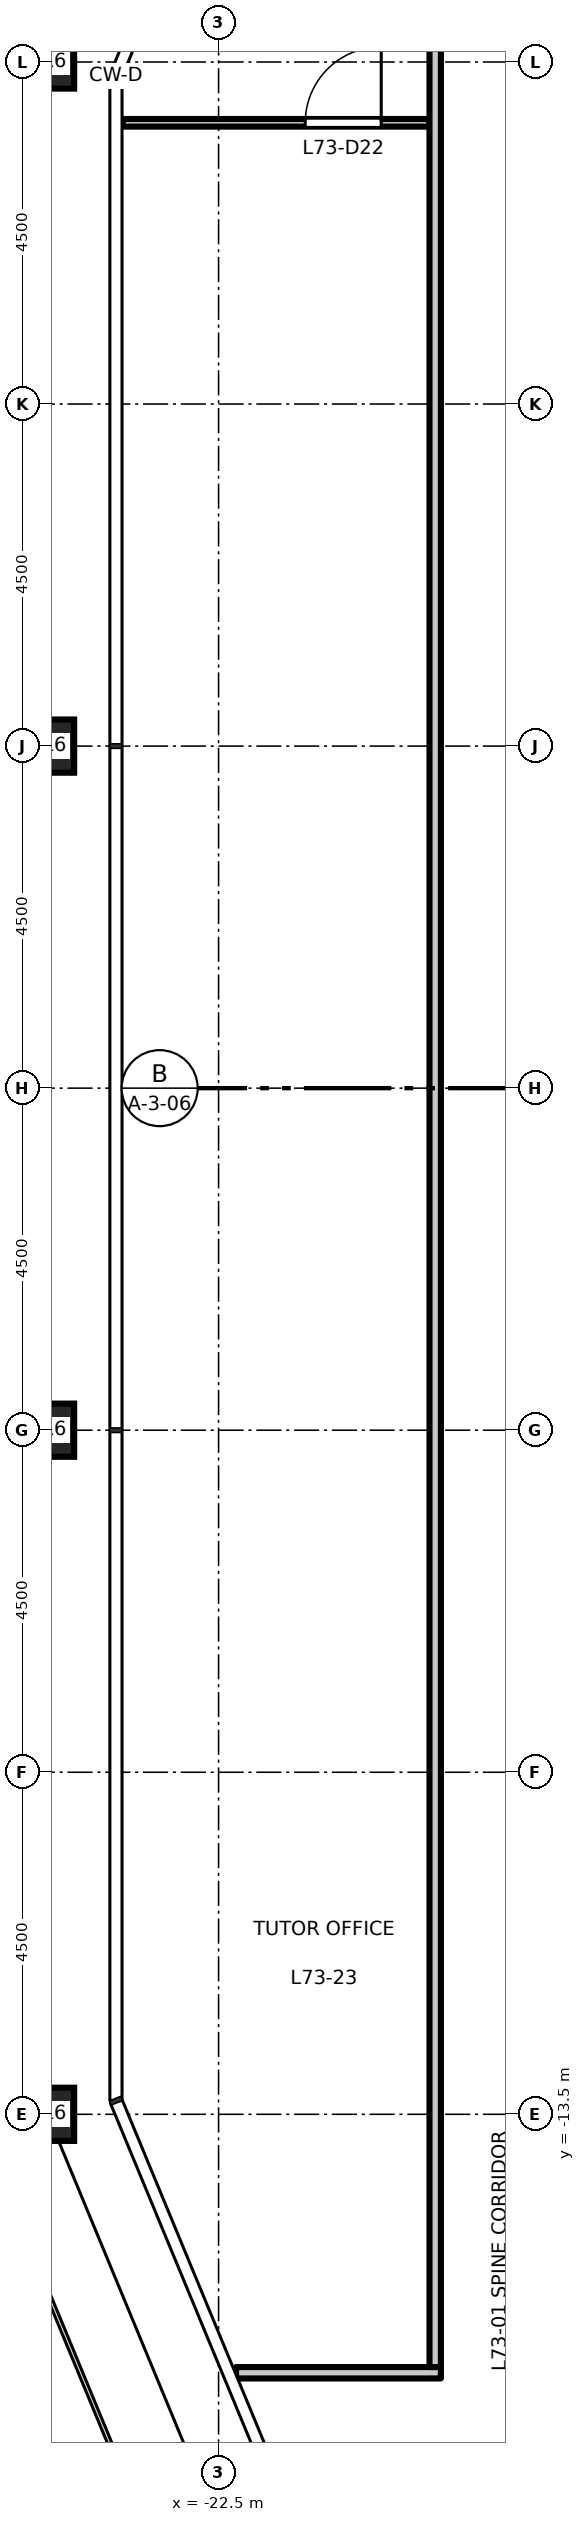
"""IFC4 building model, lengths in metres.
Left out: names, types, materials, properties, quantities, classifications, styles, units other than length and angle.
Written with IfcOpenShell. Run it as: python <this file> out.ifc"""

import sys

from ifc_helpers import new_model, si_unit, direction, frame, frame_2d, origin, origin_2d, place, context, subcontext, project, spatial, rectangle, hollow_rectangle, extrude, element, fill, save


model = new_model("IFC4")
c1 = context("Model", 3, precision=1e-05, world=origin(), true_north=direction((0.0, 1.0)))
c2 = subcontext(c1, "Body", "Model", "MODEL_VIEW")
j1 = project(units=[si_unit("LENGTHUNIT", "METRE"), si_unit("PLANEANGLEUNIT", "RADIAN")], contexts=[c1])
p1 = place(None, origin())
s1 = spatial("IfcSite", under=j1, at=p1, CompositionType="ELEMENT")
p2 = place(p1, origin())
s2 = spatial("IfcBuilding", under=s1, at=p2, CompositionType="ELEMENT")
p3 = place(p2, frame((0.0, 0.0, 339.2)))
s3 = spatial("IfcBuildingStorey", under=s2, at=p3, CompositionType="ELEMENT", Elevation=339.2)
for number, where, z_axis, x_axis in (
    (1, (-24.75, 13.5, 0.0), (0.0, 0.0, 1.0), (1.0, 0.0, 0.0)),
    (2, (-24.75, 4.5, 0.0), (0.0, 0.0, 1.0), (1.0, 0.0, 0.0)),
    (3, (-24.75, -4.5, 0.0), (0.0, 0.0, 1.0), (1.0, 0.0, 0.0)),
    (4, (-24.75, -13.5, 0.0), (0.0, 0.0, 1.0), (1.0, 0.0, 0.0)),
):
    element("IfcColumn", number, at=place(p3, frame(where, z_axis=z_axis, x_axis=x_axis)), inside=s3, PredefinedType="COLUMN", context=c2, shape_type="SweptSolid", body=[
        extrude(hollow_rectangle(XDim=0.7, YDim=0.7, WallThickness=0.036, at=origin_2d()), origin(), (0.0, 0.0, 1.0), 4.5),
    ])
p4 = place(p3, frame((-22.27, -16.9, 0.0), z_axis=(0.0, 0.0, 1.0), x_axis=(1.0, 0.0, 0.0)))
e5 = element("IfcWall", 5, at=p4, inside=s3, PredefinedType="PARTITIONING", context=c2, shape_type="SweptSolid", body=[
    extrude(rectangle(XDim=2.695, YDim=0.15, at=frame_2d((1.348, 0.0))), origin(), (0.0, 0.0, 1.0), 4.35),
])
p5 = place(p3, frame((-23.76, 12.7, 0.0), z_axis=(0.0, 0.0, 1.0), x_axis=(1.0, 0.0, 0.0)))
e6 = element("IfcWall", 6, at=p5, inside=s3, PredefinedType="PARTITIONING", context=c2, shape_type="SweptSolid", body=[
    extrude(rectangle(XDim=4.035, YDim=0.1, at=frame_2d((2.018, 0.0))), origin(), (0.0, 0.0, 1.0), 4.35),
])
p6 = place(p5, frame((2.4, 0.0, 0.0)))
e7 = element("IfcOpeningElement", 7, at=p6, cuts=e6, PredefinedType="OPENING", context=c2, shape_type="SweptSolid", body=[
    extrude(rectangle(XDim=1.0, YDim=2.1, at=frame_2d((0.5, 1.05))), frame((0.0, 0.06, 0.0), z_axis=(0.0, -1.0, 0.0), x_axis=(1.0, 0.0, 0.0)), (0.0, 0.0, 1.0), 0.12),
])
p7 = place(p3, frame((-19.65, -16.825, 0.0), z_axis=(0.0, 0.0, 1.0), x_axis=(0.0, 1.0, 0.0)))
e8 = element("IfcWall", 8, at=p7, inside=s3, PredefinedType="PARTITIONING", context=c2, shape_type="SweptSolid", body=[
    extrude(rectangle(XDim=33.65, YDim=0.15, at=frame_2d((16.825, 0.0))), origin(), (0.0, 0.0, 1.0), 4.35),
])
p8 = place(p7, frame((32.075, 0.0, 0.0)))
e9 = element("IfcOpeningElement", 9, at=p8, cuts=e8, PredefinedType="OPENING", context=c2, shape_type="SweptSolid", body=[
    extrude(rectangle(XDim=1.0, YDim=2.1, at=frame_2d((0.5, 1.05))), frame((0.0, 0.085, 0.0), z_axis=(0.0, -1.0, 0.0), x_axis=(1.0, 0.0, 0.0)), (0.0, 0.0, 1.0), 0.17),
])
p9 = place(p6, origin())
e10 = element("IfcDoor", 10, at=p9, inside=s3, OperationType="SINGLE_SWING_RIGHT", PredefinedType="DOOR", context=c2, shape_type="SweptSolid", body=[
    extrude(rectangle(XDim=1.0, YDim=2.1, at=frame_2d((0.5, 1.05))), frame((0.0, 0.025, 0.0), z_axis=(0.0, -1.0, 0.0), x_axis=(1.0, 0.0, 0.0)), (0.0, 0.0, 1.0), 0.05),
])
fill(e7, e10)
save(model, sys.argv[1])
